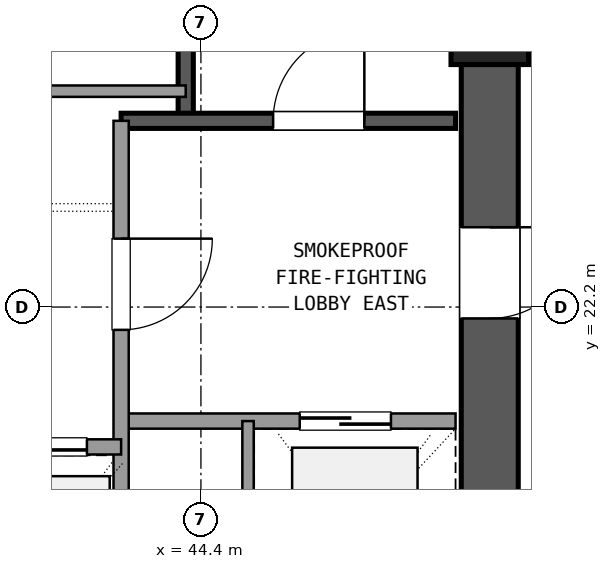
"""IFC4 building model, lengths in metres.
Left out: names, types, materials, properties, quantities, classifications, styles, units other than length and angle.
Written with IfcOpenShell. Run it as: python <this file> out.ifc"""

import sys

from ifc_helpers import new_model, si_unit, direction, frame, frame_2d, origin, origin_2d, place, context, subcontext, project, spatial, rectangle, extrude, element, fill, save


model = new_model("IFC4")
c1 = context("Model", 3, precision=1e-05, world=origin(), true_north=direction((0.0, 1.0)))
c2 = subcontext(c1, "Body", "Model", "MODEL_VIEW")
j1 = project(units=[si_unit("LENGTHUNIT", "METRE"), si_unit("PLANEANGLEUNIT", "RADIAN")], contexts=[c1])
p1 = place(None, origin())
s1 = spatial("IfcSite", under=j1, at=p1, CompositionType="ELEMENT")
p2 = place(p1, origin())
s2 = spatial("IfcBuilding", under=s1, at=p2, CompositionType="ELEMENT")
p3 = place(p2, frame((0.0, 0.0, 174.42)))
s3 = spatial("IfcBuildingStorey", under=s2, at=p3, CompositionType="ELEMENT", Elevation=174.42)
p4 = place(p3, frame((48.2, 25.9, 0.0), z_axis=(0.0, 0.0, 1.0), x_axis=(1.0, 0.0, 0.0)))
e1 = element("IfcColumn", 1, at=p4, inside=s3, PredefinedType="COLUMN", context=c2, shape_type="SweptSolid", body=[
    extrude(rectangle(XDim=1.02, YDim=1.02, at=origin_2d()), origin(), (0.0, 0.0, 1.0), 3.6),
])
p5 = place(p3, frame((48.2, 17.805, 0.0), z_axis=(0.0, 0.0, 1.0), x_axis=(0.0, 1.0, 0.0)))
e2 = element("IfcWall", 2, at=p5, inside=s3, PredefinedType="SHEAR", context=c2, shape_type="SweptSolid", body=[
    extrude(rectangle(XDim=7.59, YDim=0.75, at=frame_2d((3.795, 0.0))), origin(), (0.0, 0.0, 1.0), 3.3),
])
p6 = place(p5, frame((4.245, 0.0, 0.0)))
e3 = element("IfcOpeningElement", 3, at=p6, cuts=e2, PredefinedType="OPENING", context=c2, shape_type="SweptSolid", body=[
    extrude(rectangle(XDim=1.2, YDim=2.15, at=frame_2d((0.6, 1.075))), frame((0.0, 0.385, 0.0), z_axis=(0.0, -1.0, 0.0), x_axis=(1.0, 0.0, 0.0)), (0.0, 0.0, 1.0), 0.77),
])
p7 = place(p3, frame((44.2, 24.65, 0.0), z_axis=(0.0, 0.0, 1.0), x_axis=(0.0, 1.0, 0.0)))
e4 = element("IfcWall", 4, at=p7, inside=s3, PredefinedType="SHEAR", context=c2, shape_type="SweptSolid", body=[
    extrude(rectangle(XDim=9.4, YDim=0.2, at=frame_2d((4.7, 0.0))), origin(), (0.0, 0.0, 1.0), 3.3),
])
p8 = place(p3, frame((43.35, 24.65, 0.0), z_axis=(0.0, 0.0, 1.0), x_axis=(1.0, 0.0, 0.0)))
e5 = element("IfcWall", 5, at=p8, inside=s3, PredefinedType="SHEAR", context=c2, shape_type="SweptSolid", body=[
    extrude(rectangle(XDim=4.4, YDim=0.2, at=frame_2d((2.2, 0.0))), origin(), (0.0, 0.0, 1.0), 3.3),
])
p9 = place(p8, frame((2.0, 0.0, 0.0)))
e6 = element("IfcOpeningElement", 6, at=p9, cuts=e5, PredefinedType="OPENING", context=c2, shape_type="SweptSolid", body=[
    extrude(rectangle(XDim=1.2, YDim=2.15, at=frame_2d((0.6, 1.075))), frame((0.0, 0.11, 0.0), z_axis=(0.0, -1.0, 0.0), x_axis=(1.0, 0.0, 0.0)), (0.0, 0.0, 1.0), 0.22),
])
p10 = place(p3, frame((43.35, 20.7, 0.0), z_axis=(0.0, 0.0, 1.0), x_axis=(1.0, 0.0, 0.0)))
e7 = element("IfcWall", 7, at=p10, inside=s3, PredefinedType="SOLIDWALL", context=c2, shape_type="SweptSolid", body=[
    extrude(rectangle(XDim=4.4, YDim=0.2, at=frame_2d((2.2, 0.0))), origin(), (0.0, 0.0, 1.0), 2.59),
])
p11 = place(p10, frame((2.35, 0.0, 0.0)))
e8 = element("IfcOpeningElement", 8, at=p11, cuts=e7, PredefinedType="OPENING", context=c2, shape_type="SweptSolid", body=[
    extrude(rectangle(XDim=1.2, YDim=2.15, at=frame_2d((0.6, 1.075))), frame((0.0, 0.11, 0.0), z_axis=(0.0, -1.0, 0.0), x_axis=(1.0, 0.0, 0.0)), (0.0, 0.0, 1.0), 0.22),
])
p12 = place(p3, frame((43.35, 17.75, 0.0), z_axis=(0.0, 0.0, 1.0), x_axis=(0.0, 1.0, 0.0)))
e9 = element("IfcWall", 9, at=p12, inside=s3, PredefinedType="SOLIDWALL", context=c2, shape_type="SweptSolid", body=[
    extrude(rectangle(XDim=6.9, YDim=0.2, at=frame_2d((3.45, 0.0))), origin(), (0.0, 0.0, 1.0), 2.59),
])
p13 = place(p12, frame((4.15, 0.0, 0.0)))
e10 = element("IfcOpeningElement", 10, at=p13, cuts=e9, PredefinedType="OPENING", context=c2, shape_type="SweptSolid", body=[
    extrude(rectangle(XDim=1.2, YDim=2.15, at=frame_2d((0.6, 1.075))), frame((0.0, 0.11, 0.0), z_axis=(0.0, -1.0, 0.0), x_axis=(1.0, 0.0, 0.0)), (0.0, 0.0, 1.0), 0.22),
])
p14 = place(p3, frame((45.02, 17.75, 0.0), z_axis=(0.0, 0.0, 1.0), x_axis=(0.0, 1.0, 0.0)))
e11 = element("IfcWall", 11, at=p14, inside=s3, PredefinedType="PARTITIONING", context=c2, shape_type="SweptSolid", body=[
    extrude(rectangle(XDim=2.95, YDim=0.15, at=frame_2d((1.475, 0.0))), origin(), (0.0, 0.0, 1.0), 2.59),
])
p15 = place(p3, frame((37.25, 20.36, 0.0), z_axis=(0.0, 0.0, 1.0), x_axis=(1.0, 0.0, 0.0)))
e12 = element("IfcWall", 12, at=p15, inside=s3, PredefinedType="SOLIDWALL", context=c2, shape_type="SweptSolid", body=[
    extrude(rectangle(XDim=6.1, YDim=0.2, at=frame_2d((3.05, 0.0))), origin(), (0.0, 0.0, 1.0), 2.59),
])
p16 = place(p15, frame((0.45, 0.0, 0.0)))
e13 = element("IfcOpeningElement", 13, at=p16, cuts=e12, PredefinedType="OPENING", context=c2, shape_type="SweptSolid", body=[
    extrude(rectangle(XDim=1.1, YDim=2.15, at=frame_2d((0.55, 1.075))), frame((0.0, 0.11, 0.0), z_axis=(0.0, -1.0, 0.0), x_axis=(1.0, 0.0, 0.0)), (0.0, 0.0, 1.0), 0.22),
])
p17 = place(p15, frame((2.5, 0.0, 0.0)))
e14 = element("IfcOpeningElement", 14, at=p17, cuts=e12, PredefinedType="OPENING", context=c2, shape_type="SweptSolid", body=[
    extrude(rectangle(XDim=1.1, YDim=2.15, at=frame_2d((0.55, 1.075))), frame((0.0, 0.11, 0.0), z_axis=(0.0, -1.0, 0.0), x_axis=(1.0, 0.0, 0.0)), (0.0, 0.0, 1.0), 0.22),
])
p18 = place(p15, frame((4.55, 0.0, 0.0)))
e15 = element("IfcOpeningElement", 15, at=p18, cuts=e12, PredefinedType="OPENING", context=c2, shape_type="SweptSolid", body=[
    extrude(rectangle(XDim=1.1, YDim=2.15, at=frame_2d((0.55, 1.075))), frame((0.0, 0.11, 0.0), z_axis=(0.0, -1.0, 0.0), x_axis=(1.0, 0.0, 0.0)), (0.0, 0.0, 1.0), 0.22),
])
p19 = place(p3, frame((42.27, 25.04, 0.0), z_axis=(0.0, 0.0, 1.0), x_axis=(1.0, 0.0, 0.0)))
e16 = element("IfcWall", 16, at=p19, inside=s3, PredefinedType="PARTITIONING", context=c2, shape_type="SweptSolid", body=[
    extrude(rectangle(XDim=1.93, YDim=0.15, at=frame_2d((0.965, 0.0))), origin(), (0.0, 0.0, 1.0), 2.59),
])
p20 = place(p9, origin())
e17 = element("IfcDoor", 17, at=p20, inside=s3, OperationType="SINGLE_SWING_RIGHT", PredefinedType="DOOR", context=c2, shape_type="SweptSolid", body=[
    extrude(rectangle(XDim=1.2, YDim=2.15, at=frame_2d((0.6, 1.075))), frame((0.0, 0.025, 0.0), z_axis=(0.0, -1.0, 0.0), x_axis=(1.0, 0.0, 0.0)), (0.0, 0.0, 1.0), 0.05),
])
fill(e6, e17)
p21 = place(p11, origin())
e18 = element("IfcDoor", 18, at=p21, inside=s3, OperationType="SLIDING_TO_RIGHT", PredefinedType="DOOR", context=c2, shape_type="SweptSolid", body=[
    extrude(rectangle(XDim=1.2, YDim=2.15, at=frame_2d((0.6, 1.075))), frame((0.0, 0.025, 0.0), z_axis=(0.0, -1.0, 0.0), x_axis=(1.0, 0.0, 0.0)), (0.0, 0.0, 1.0), 0.05),
])
fill(e8, e18)
p22 = place(p13, frame((1.2, 0.0, 0.0), z_axis=(0.0, 0.0, 1.0), x_axis=(-1.0, 0.0, 0.0)))
e19 = element("IfcDoor", 19, at=p22, inside=s3, OperationType="SINGLE_SWING_RIGHT", PredefinedType="DOOR", context=c2, shape_type="SweptSolid", body=[
    extrude(rectangle(XDim=1.2, YDim=2.15, at=frame_2d((0.6, 1.075))), frame((0.0, 0.025, 0.0), z_axis=(0.0, -1.0, 0.0), x_axis=(1.0, 0.0, 0.0)), (0.0, 0.0, 1.0), 0.05),
])
fill(e10, e19)
p23 = place(p6, frame((1.2, 0.0, 0.0), z_axis=(0.0, 0.0, 1.0), x_axis=(-1.0, 0.0, 0.0)))
e20 = element("IfcDoor", 20, at=p23, inside=s3, OperationType="SINGLE_SWING_RIGHT", PredefinedType="DOOR", context=c2, shape_type="SweptSolid", body=[
    extrude(rectangle(XDim=1.2, YDim=2.15, at=frame_2d((0.6, 1.075))), frame((0.0, 0.025, 0.0), z_axis=(0.0, -1.0, 0.0), x_axis=(1.0, 0.0, 0.0)), (0.0, 0.0, 1.0), 0.05),
])
fill(e3, e20)
p24 = place(p18, origin())
e21 = element("IfcDoor", 21, at=p24, inside=s3, OperationType="SLIDING_TO_LEFT", PredefinedType="DOOR", context=c2, shape_type="SweptSolid", body=[
    extrude(rectangle(XDim=1.1, YDim=2.15, at=frame_2d((0.55, 1.075))), frame((0.0, 0.025, 0.0), z_axis=(0.0, -1.0, 0.0), x_axis=(1.0, 0.0, 0.0)), (0.0, 0.0, 1.0), 0.05),
])
fill(e15, e21)
save(model, sys.argv[1])
